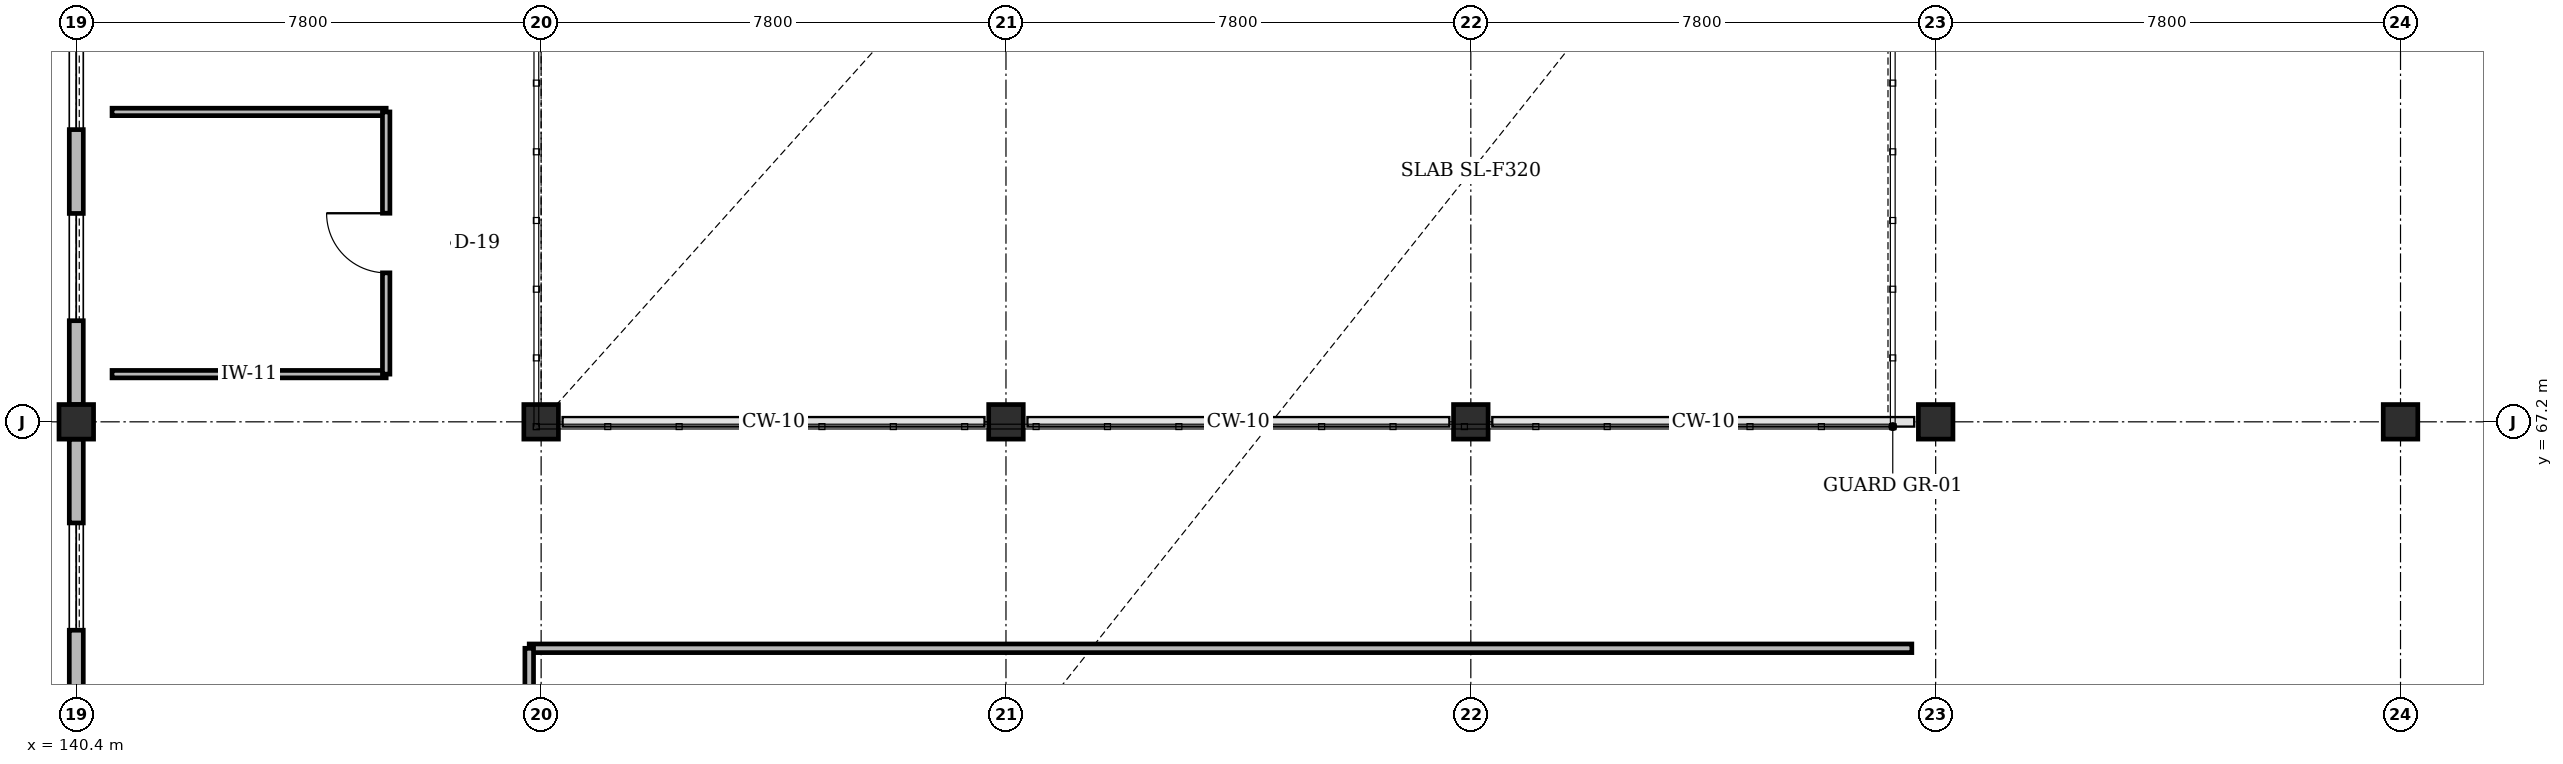
"""IFC4 building model, lengths in metres.
Left out: names, types, materials, properties, quantities, classifications, styles, units other than length and angle.
Written with IfcOpenShell. Run it as: python <this file> out.ifc"""

import sys

from ifc_helpers import new_model, si_unit, direction, frame, frame_2d, origin, origin_2d, place, context, subcontext, project, spatial, rectangle, extrude, element, fill, save


model = new_model("IFC4")
c1 = context("Model", 3, precision=1e-05, world=origin(), true_north=direction((0.0, 1.0)))
c2 = subcontext(c1, "Body", "Model", "MODEL_VIEW")
j1 = project(units=[si_unit("LENGTHUNIT", "METRE"), si_unit("PLANEANGLEUNIT", "RADIAN")], contexts=[c1])
p1 = place(None, origin())
s1 = spatial("IfcSite", under=j1, at=p1, CompositionType="ELEMENT")
p2 = place(p1, origin())
s2 = spatial("IfcBuilding", under=s1, at=p2, CompositionType="ELEMENT")
p3 = place(p2, frame((0.0, 0.0, 14.4)))
s3 = spatial("IfcBuildingStorey", under=s2, at=p3, CompositionType="ELEMENT", Elevation=14.4)
for number, where, z_axis, x_axis in (
    (1, (140.4, 67.2, 0.0), (0.0, 0.0, 1.0), (1.0, 0.0, 0.0)),
    (2, (148.2, 67.2, 0.0), (0.0, 0.0, 1.0), (1.0, 0.0, 0.0)),
    (3, (156.0, 67.2, 0.0), (0.0, 0.0, 1.0), (1.0, 0.0, 0.0)),
    (4, (163.8, 67.2, 0.0), (0.0, 0.0, 1.0), (1.0, 0.0, 0.0)),
    (5, (171.6, 67.2, 0.0), (0.0, 0.0, 1.0), (1.0, 0.0, 0.0)),
    (6, (179.4, 67.2, 0.0), (0.0, 0.0, 1.0), (1.0, 0.0, 0.0)),
):
    element("IfcColumn", number, at=place(p3, frame(where, z_axis=z_axis, x_axis=x_axis)), inside=s3, PredefinedType="COLUMN", context=c2, shape_type="SweptSolid", body=[
        extrude(rectangle(XDim=0.58, YDim=0.58, at=origin_2d()), origin(), (0.0, 0.0, 1.0), 3.6),
    ])
p4 = place(p3, frame((140.4, 59.09, 0.0), z_axis=(0.0, 0.0, 1.0), x_axis=(0.0, 1.0, 0.0)))
e7 = element("IfcWall", 7, at=p4, inside=s3, PredefinedType="STANDARD", context=c2, shape_type="SweptSolid", body=[
    extrude(rectangle(XDim=7.82, YDim=0.235, at=frame_2d((3.91, 0.0))), origin(), (0.0, 0.0, 1.0), 2.605),
])
p5 = place(p4, frame((1.407, 0.0, 0.9)))
e8 = element("IfcOpeningElement", 8, at=p5, cuts=e7, PredefinedType="OPENING", context=c2, shape_type="SweptSolid", body=[
    extrude(rectangle(XDim=1.8, YDim=1.05, at=frame_2d((0.9, 0.525))), frame((0.0, 0.127, 0.0), z_axis=(0.0, -1.0, 0.0), x_axis=(1.0, 0.0, 0.0)), (0.0, 0.0, 1.0), 0.255),
])
p6 = place(p4, frame((4.613, 0.0, 0.9)))
e9 = element("IfcOpeningElement", 9, at=p6, cuts=e7, PredefinedType="OPENING", context=c2, shape_type="SweptSolid", body=[
    extrude(rectangle(XDim=1.8, YDim=1.05, at=frame_2d((0.9, 0.525))), frame((0.0, 0.127, 0.0), z_axis=(0.0, -1.0, 0.0), x_axis=(1.0, 0.0, 0.0)), (0.0, 0.0, 1.0), 0.255),
])
p7 = place(p3, frame((140.4, 67.49, 0.0), z_axis=(0.0, 0.0, 1.0), x_axis=(0.0, 1.0, 0.0)))
e10 = element("IfcWall", 10, at=p7, inside=s3, PredefinedType="STANDARD", context=c2, shape_type="SweptSolid", body=[
    extrude(rectangle(XDim=7.82, YDim=0.235, at=frame_2d((3.91, 0.0))), origin(), (0.0, 0.0, 1.0), 2.605),
])
p8 = place(p7, frame((1.407, 0.0, 0.9)))
e11 = element("IfcOpeningElement", 11, at=p8, cuts=e10, PredefinedType="OPENING", context=c2, shape_type="SweptSolid", body=[
    extrude(rectangle(XDim=1.8, YDim=1.05, at=frame_2d((0.9, 0.525))), frame((0.0, 0.127, 0.0), z_axis=(0.0, -1.0, 0.0), x_axis=(1.0, 0.0, 0.0)), (0.0, 0.0, 1.0), 0.255),
])
p9 = place(p7, frame((4.613, 0.0, 0.9)))
e12 = element("IfcOpeningElement", 12, at=p9, cuts=e10, PredefinedType="OPENING", context=c2, shape_type="SweptSolid", body=[
    extrude(rectangle(XDim=1.8, YDim=1.05, at=frame_2d((0.9, 0.525))), frame((0.0, 0.127, 0.0), z_axis=(0.0, -1.0, 0.0), x_axis=(1.0, 0.0, 0.0)), (0.0, 0.0, 1.0), 0.255),
])
for number, where, z_axis, x_axis in (
    (13, (141.0, 68.0, 0.0), (0.0, 0.0, 1.0), (1.0, 0.0, 0.0)),
    (14, (141.0, 72.4, 0.0), (0.0, 0.0, 1.0), (1.0, 0.0, 0.0)),
):
    element("IfcWall", number, at=place(p3, frame(where, z_axis=z_axis, x_axis=x_axis)), inside=s3, PredefinedType="PARTITIONING", context=c2, shape_type="SweptSolid", body=[
        extrude(rectangle(XDim=4.6, YDim=0.125, at=frame_2d((2.3, 0.0))), origin(), (0.0, 0.0, 1.0), 3.3),
    ])
p10 = place(p3, frame((145.6, 68.0, 0.0), z_axis=(0.0, 0.0, 1.0), x_axis=(0.0, 1.0, 0.0)))
e15 = element("IfcWall", 15, at=p10, inside=s3, PredefinedType="PARTITIONING", context=c2, shape_type="SweptSolid", body=[
    extrude(rectangle(XDim=4.4, YDim=0.125, at=frame_2d((2.2, 0.0))), origin(), (0.0, 0.0, 1.0), 3.3),
])
p11 = place(p10, frame((1.7, 0.0, 0.0)))
e16 = element("IfcOpeningElement", 16, at=p11, cuts=e15, PredefinedType="OPENING", context=c2, shape_type="SweptSolid", body=[
    extrude(rectangle(XDim=1.0, YDim=2.1, at=frame_2d((0.5, 1.05))), frame((0.0, 0.073, 0.0), z_axis=(0.0, -1.0, 0.0), x_axis=(1.0, 0.0, 0.0)), (0.0, 0.0, 1.0), 0.145),
])
p12 = place(p3, frame((148.0, 63.4, 0.0), z_axis=(0.0, 0.0, 1.0), x_axis=(1.0, 0.0, 0.0)))
e17 = element("IfcWall", 17, at=p12, inside=s3, PredefinedType="PARTITIONING", context=c2, shape_type="SweptSolid", body=[
    extrude(rectangle(XDim=23.2, YDim=0.145, at=frame_2d((11.6, 0.0))), origin(), (0.0, 0.0, 1.0), 3.3),
])
p13 = place(p3, frame((148.0, 42.4, 0.0), z_axis=(0.0, 0.0, 1.0), x_axis=(0.0, 1.0, 0.0)))
e18 = element("IfcWall", 18, at=p13, inside=s3, PredefinedType="PARTITIONING", context=c2, shape_type="SweptSolid", body=[
    extrude(rectangle(XDim=21.0, YDim=0.145, at=frame_2d((10.5, 0.0))), origin(), (0.0, 0.0, 1.0), 2.605),
])
p14 = place(p13, frame((9.925, 0.0, 0.0)))
e19 = element("IfcOpeningElement", 19, at=p14, cuts=e18, PredefinedType="OPENING", context=c2, shape_type="SweptSolid", body=[
    extrude(rectangle(XDim=1.15, YDim=2.15, at=frame_2d((0.575, 1.075))), frame((0.0, 0.083, 0.0), z_axis=(0.0, -1.0, 0.0), x_axis=(1.0, 0.0, 0.0)), (0.0, 0.0, 1.0), 0.165),
])
p15 = place(p6, origin())
e20 = element("IfcWindow", 20, at=p15, inside=s3, PartitioningType="SINGLE_PANEL", PredefinedType="WINDOW", context=c2, shape_type="SweptSolid", body=[
    extrude(rectangle(XDim=1.8, YDim=1.05, at=frame_2d((0.9, 0.525))), frame((0.0, 0.03, 0.0), z_axis=(0.0, -1.0, 0.0), x_axis=(1.0, 0.0, 0.0)), (0.0, 0.0, 1.0), 0.06),
])
fill(e9, e20)
p16 = place(p8, origin())
e21 = element("IfcWindow", 21, at=p16, inside=s3, PartitioningType="SINGLE_PANEL", PredefinedType="WINDOW", context=c2, shape_type="SweptSolid", body=[
    extrude(rectangle(XDim=1.8, YDim=1.05, at=frame_2d((0.9, 0.525))), frame((0.0, 0.03, 0.0), z_axis=(0.0, -1.0, 0.0), x_axis=(1.0, 0.0, 0.0)), (0.0, 0.0, 1.0), 0.06),
])
fill(e11, e21)
p17 = place(p9, origin())
e22 = element("IfcWindow", 22, at=p17, inside=s3, PartitioningType="SINGLE_PANEL", PredefinedType="WINDOW", context=c2, shape_type="SweptSolid", body=[
    extrude(rectangle(XDim=1.8, YDim=1.05, at=frame_2d((0.9, 0.525))), frame((0.0, 0.03, 0.0), z_axis=(0.0, -1.0, 0.0), x_axis=(1.0, 0.0, 0.0)), (0.0, 0.0, 1.0), 0.06),
])
fill(e12, e22)
p18 = place(p11, origin())
e23 = element("IfcDoor", 23, at=p18, inside=s3, OperationType="SINGLE_SWING_RIGHT", PredefinedType="DOOR", context=c2, shape_type="SweptSolid", body=[
    extrude(rectangle(XDim=1.0, YDim=2.1, at=frame_2d((0.5, 1.05))), frame((0.0, 0.025, 0.0), z_axis=(0.0, -1.0, 0.0), x_axis=(1.0, 0.0, 0.0)), (0.0, 0.0, 1.0), 0.05),
])
fill(e16, e23)
save(model, sys.argv[1])
